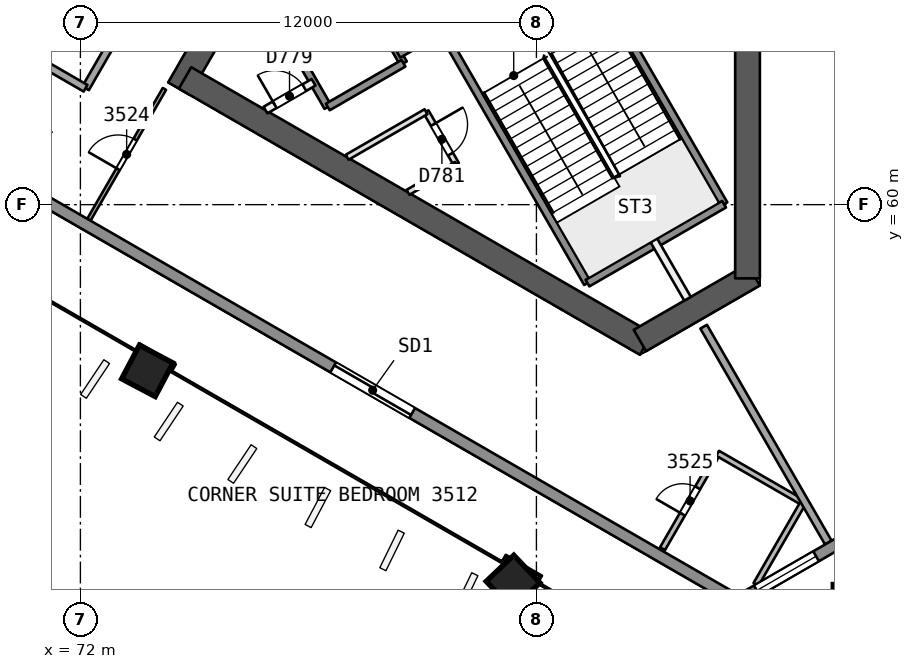
"""IFC4 building model, lengths in metres.
Left out: names, types, materials, properties, quantities, classifications, styles, units other than length and angle.
Written with IfcOpenShell. Run it as: python <this file> out.ifc"""

import sys

from ifc_helpers import new_model, si_unit, direction, frame, frame_2d, origin, origin_2d, place, context, subcontext, project, spatial, rectangle, extrude, element, fill, save


model = new_model("IFC4")
c1 = context("Model", 3, precision=1e-05, world=origin(), true_north=direction((0.0, 1.0)))
c2 = subcontext(c1, "Body", "Model", "MODEL_VIEW")
j1 = project(units=[si_unit("LENGTHUNIT", "METRE"), si_unit("PLANEANGLEUNIT", "RADIAN")], contexts=[c1])
p1 = place(None, origin())
s1 = spatial("IfcSite", under=j1, at=p1, CompositionType="ELEMENT")
p2 = place(p1, origin())
s2 = spatial("IfcBuilding", under=s1, at=p2, CompositionType="ELEMENT")
p3 = place(p2, frame((0.0, 0.0, 143.8)))
s3 = spatial("IfcBuildingStorey", under=s2, at=p3, CompositionType="ELEMENT", Elevation=143.8)
p4 = place(p3, frame((79.688, 71.881, 0.0), z_axis=(0.0, 0.0, 1.0), x_axis=(-0.49999822179, -0.866026430432, 0.0)))
e1 = element("IfcWall", 1, at=p4, inside=s3, PredefinedType="SHEAR", context=c2, shape_type="SweptSolid", body=[
    extrude(rectangle(XDim=10.192, YDim=0.65, at=frame_2d((5.096, 0.0))), origin(), (0.0, 0.0, 1.0), 3.7),
])
p5 = place(p4, frame((0.762, 0.0, 0.0)))
e2 = element("IfcOpeningElement", 2, at=p5, cuts=e1, PredefinedType="OPENING", context=c2, shape_type="SweptSolid", body=[
    extrude(rectangle(XDim=1.2, YDim=2.1, at=frame_2d((0.6, 1.05))), frame((0.0, 0.335, 0.0), z_axis=(0.0, -1.0, 0.0), x_axis=(1.0, 0.0, 0.0)), (0.0, 0.0, 1.0), 0.671),
])
p6 = place(p3, frame((74.754, 63.335, 0.0), z_axis=(0.0, 0.0, 1.0), x_axis=(0.866026250715, -0.49999853307, 0.0)))
e3 = element("IfcWall", 3, at=p6, inside=s3, PredefinedType="SHEAR", context=c2, shape_type="SweptSolid", body=[
    extrude(rectangle(XDim=14.008, YDim=0.65, at=frame_2d((7.004, 0.0))), origin(), (0.0, 0.0, 1.0), 3.7),
])
p7 = place(p3, frame((86.723, 56.425, 0.0), z_axis=(0.0, 0.0, 1.0), x_axis=(0.866031550877, 0.499989352773, 0.0)))
e4 = element("IfcWall", 4, at=p7, inside=s3, PredefinedType="SHEAR", context=c2, shape_type="SweptSolid", body=[
    extrude(rectangle(XDim=3.458, YDim=0.65, at=frame_2d((1.729, 0.0))), origin(), (0.0, 0.0, 1.0), 3.7),
])
p8 = place(p3, frame((89.555, 58.06, 0.0), z_axis=(0.0, 0.0, 1.0), x_axis=(0.0, 1.0, 0.0)))
e5 = element("IfcWall", 5, at=p8, inside=s3, PredefinedType="SHEAR", context=c2, shape_type="SweptSolid", body=[
    extrude(rectangle(XDim=14.146, YDim=0.65, at=frame_2d((7.073, 0.0))), origin(), (0.0, 0.0, 1.0), 3.7),
])
p9 = place(p3, frame((73.76, 55.599, 0.0), z_axis=(0.000857578916, 0.022824792675, 0.999739112668), x_axis=(-0.499948827021, -0.865819429986, 0.020196163479)))
e6 = element("IfcColumn", 6, at=p9, inside=s3, PredefinedType="COLUMN", context=c2, shape_type="SweptSolid", body=[
    extrude(rectangle(XDim=1.0, YDim=1.0, at=origin_2d()), origin(), (0.0, 0.0, 1.0), 3.701),
])
p10 = place(p3, frame((83.395, 50.035, 0.0), z_axis=(-0.00837646992, 0.028097450282, 0.999570091609), x_axis=(-0.499684075079, -0.865973216997, 0.020154715467)))
e7 = element("IfcColumn", 7, at=p10, inside=s3, PredefinedType="COLUMN", context=c2, shape_type="SweptSolid", body=[
    extrude(rectangle(XDim=1.0, YDim=1.0, at=origin_2d()), origin(), (0.0, 0.0, 1.0), 3.702),
])
p11 = place(p3, frame((93.031, 48.769, 0.0), z_axis=(-0.017607001884, 0.030531992032, 0.999378702468), x_axis=(0.4992500341, -0.865740835585, 0.035244986208)))
e8 = element("IfcColumn", 8, at=p11, inside=s3, PredefinedType="COLUMN", context=c2, shape_type="SweptSolid", body=[
    extrude(rectangle(XDim=2.4, YDim=2.4, at=origin_2d()), origin(), (0.0, 0.0, 1.0), 3.702),
])
p12 = place(p3, frame((88.401, 56.789, 0.0), z_axis=(0.0, 0.0, 1.0), x_axis=(0.499993018469, -0.866029434536, 0.0)))
e9 = element("IfcWall", 9, at=p12, inside=s3, PredefinedType="PARTITIONING", context=c2, shape_type="SweptSolid", body=[
    extrude(rectangle(XDim=6.561, YDim=0.2, at=frame_2d((3.281, 0.0))), origin(), (0.0, 0.0, 1.0), 3.25),
])
p13 = place(p3, frame((67.363, 62.408, 0.0), z_axis=(0.0, 0.0, 1.0), x_axis=(0.500002969958, 0.866023689072, 0.0)))
e10 = element("IfcWall", 10, at=p13, inside=s3, PredefinedType="PARTITIONING", context=c2, shape_type="SweptSolid", body=[
    extrude(rectangle(XDim=11.954, YDim=0.2, at=frame_2d((5.977, 0.0))), origin(), (0.0, 0.0, 1.0), 3.25),
])
p14 = place(p3, frame((72.223, 59.602, 0.0), z_axis=(0.0, 0.0, 1.0), x_axis=(0.499997169302, 0.866027038082, 0.0)))
e11 = element("IfcWall", 11, at=p14, inside=s3, PredefinedType="PARTITIONING", context=c2, shape_type="SweptSolid", body=[
    extrude(rectangle(XDim=3.975, YDim=0.1, at=frame_2d((1.987, 0.0))), origin(), (0.0, 0.0, 1.0), 3.25),
])
p15 = place(p14, frame((1.537, 0.0, 0.0)))
e12 = element("IfcOpeningElement", 12, at=p15, cuts=e11, PredefinedType="OPENING", context=c2, shape_type="SweptSolid", body=[
    extrude(rectangle(XDim=0.9, YDim=2.1, at=frame_2d((0.45, 1.05))), frame((0.0, 0.061, 0.0), z_axis=(0.0, -1.0, 0.0), x_axis=(1.0, 0.0, 0.0)), (0.0, 0.0, 1.0), 0.121),
])
p16 = place(p3, frame((76.636, 70.857, 0.0), z_axis=(0.0, 0.0, 1.0), x_axis=(-0.499990139034, -0.866031096941, 0.0)))
e13 = element("IfcWall", 13, at=p16, inside=s3, PredefinedType="PARTITIONING", context=c2, shape_type="SweptSolid", body=[
    extrude(rectangle(XDim=9.0, YDim=0.2, at=frame_2d((4.5, 0.0))), origin(), (0.0, 0.0, 1.0), 3.25),
])
p17 = place(p3, frame((72.136, 63.063, 0.0), z_axis=(0.0, 0.0, 1.0), x_axis=(-0.866010750942, 0.50002537861, 0.0)))
e14 = element("IfcWall", 14, at=p17, inside=s3, PredefinedType="PARTITIONING", context=c2, shape_type="SweptSolid", body=[
    extrude(rectangle(XDim=2.0, YDim=0.2, at=frame_2d((1.0, 0.0))), origin(), (0.0, 0.0, 1.0), 3.25),
])
p18 = place(p3, frame((70.404, 64.063, 0.0), z_axis=(0.0, 0.0, 1.0), x_axis=(0.499990139034, 0.866031096941, 0.0)))
e15 = element("IfcWall", 15, at=p18, inside=s3, PredefinedType="PARTITIONING", context=c2, shape_type="SweptSolid", body=[
    extrude(rectangle(XDim=9.0, YDim=0.2, at=frame_2d((4.5, 0.0))), origin(), (0.0, 0.0, 1.0), 3.25),
])
p19 = place(p18, frame((4.05, 0.0, 0.0)))
e16 = element("IfcOpeningElement", 16, at=p19, cuts=e15, PredefinedType="OPENING", context=c2, shape_type="SweptSolid", body=[
    extrude(rectangle(XDim=0.9, YDim=2.1, at=frame_2d((0.45, 1.05))), frame((0.0, 0.11, 0.0), z_axis=(0.0, -1.0, 0.0), x_axis=(1.0, 0.0, 0.0)), (0.0, 0.0, 1.0), 0.221),
])
p20 = place(p3, frame((87.318, 50.947, 0.0), z_axis=(0.0, 0.0, 1.0), x_axis=(0.499987231761, 0.866032775405, 0.0)))
e17 = element("IfcWall", 17, at=p20, inside=s3, PredefinedType="PARTITIONING", context=c2, shape_type="SweptSolid", body=[
    extrude(rectangle(XDim=2.9, YDim=0.15, at=frame_2d((1.45, 0.0))), origin(), (0.0, 0.0, 1.0), 3.25),
])
p21 = place(p20, frame((1.05, 0.0, 0.0)))
e18 = element("IfcOpeningElement", 18, at=p21, cuts=e17, PredefinedType="OPENING", context=c2, shape_type="SweptSolid", body=[
    extrude(rectangle(XDim=0.8, YDim=2.1, at=frame_2d((0.4, 1.05))), frame((0.0, 0.085, 0.0), z_axis=(0.0, -1.0, 0.0), x_axis=(1.0, 0.0, 0.0)), (0.0, 0.0, 1.0), 0.171),
])
p22 = place(p3, frame((88.768, 53.458, 0.0), z_axis=(0.0, 0.0, 1.0), x_axis=(0.866021400173, -0.500006934395, 0.0)))
e19 = element("IfcWall", 19, at=p22, inside=s3, PredefinedType="PARTITIONING", context=c2, shape_type="SweptSolid", body=[
    extrude(rectangle(XDim=2.6, YDim=0.15, at=frame_2d((1.3, 0.0))), origin(), (0.0, 0.0, 1.0), 3.25),
])
p23 = place(p3, frame((91.02, 52.158, 0.0), z_axis=(0.0, 0.0, 1.0), x_axis=(-0.500008956979, -0.866020232408, 0.0)))
e20 = element("IfcWall", 20, at=p23, inside=s3, PredefinedType="PARTITIONING", context=c2, shape_type="SweptSolid", body=[
    extrude(rectangle(XDim=2.483, YDim=0.15, at=frame_2d((1.242, 0.0))), origin(), (0.0, 0.0, 1.0), 3.25),
])
p24 = place(p3, frame((94.202, 52.39, 0.0), z_axis=(0.0, 0.0, 1.0), x_axis=(-0.866019355129, -0.500010476433, 0.0)))
e21 = element("IfcWall", 21, at=p24, inside=s3, PredefinedType="SOLIDWALL", context=c2, shape_type="SweptSolid", body=[
    extrude(rectangle(XDim=5.65, YDim=0.3, at=frame_2d((2.825, 0.0))), origin(), (0.0, 0.0, 1.0), 3.25),
])
p25 = place(p24, frame((3.284, 0.0, 0.9)))
e22 = element("IfcOpeningElement", 22, at=p25, cuts=e21, PredefinedType="OPENING", context=c2, shape_type="SweptSolid", body=[
    extrude(rectangle(XDim=1.8, YDim=1.5, at=frame_2d((0.9, 0.75))), frame((0.0, 0.161, 0.0), z_axis=(0.0, -1.0, 0.0), x_axis=(1.0, 0.0, 0.0)), (0.0, 0.0, 1.0), 0.321),
])
p26 = place(p24, frame((0.47, 0.0, 0.9)))
e23 = element("IfcOpeningElement", 23, at=p26, cuts=e21, PredefinedType="OPENING", context=c2, shape_type="SweptSolid", body=[
    extrude(rectangle(XDim=1.8, YDim=1.5, at=frame_2d((0.9, 0.75))), frame((0.0, 0.161, 0.0), z_axis=(0.0, -1.0, 0.0), x_axis=(1.0, 0.0, 0.0)), (0.0, 0.0, 1.0), 0.321),
])
p27 = place(p3, frame((89.31, 49.565, 0.0), z_axis=(0.0, 0.0, 1.0), x_axis=(-0.866024712045, 0.500001198125, 0.0)))
e24 = element("IfcWall", 24, at=p27, inside=s3, PredefinedType="SOLIDWALL", context=c2, shape_type="SweptSolid", body=[
    extrude(rectangle(XDim=55.219, YDim=0.3, at=frame_2d((27.61, 0.0))), origin(), (0.0, 0.0, 1.0), 3.25),
])
p28 = place(p27, frame((31.086, 0.0, 0.0)))
e25 = element("IfcOpeningElement", 25, at=p28, cuts=e24, PredefinedType="OPENING", context=c2, shape_type="SweptSolid", body=[
    extrude(rectangle(XDim=2.4, YDim=2.4, at=frame_2d((1.2, 1.2))), frame((0.0, 0.161, 0.0), z_axis=(0.0, -1.0, 0.0), x_axis=(1.0, 0.0, 0.0)), (0.0, 0.0, 1.0), 0.321),
])
p29 = place(p27, frame((42.892, 0.0, 0.0)))
e26 = element("IfcOpeningElement", 26, at=p29, cuts=e24, PredefinedType="OPENING", context=c2, shape_type="SweptSolid", body=[
    extrude(rectangle(XDim=2.4, YDim=2.4, at=frame_2d((1.2, 1.2))), frame((0.0, 0.161, 0.0), z_axis=(0.0, -1.0, 0.0), x_axis=(1.0, 0.0, 0.0)), (0.0, 0.0, 1.0), 0.321),
])
p30 = place(p27, frame((21.421, 0.0, 0.0)))
e27 = element("IfcOpeningElement", 27, at=p30, cuts=e24, PredefinedType="OPENING", context=c2, shape_type="SweptSolid", body=[
    extrude(rectangle(XDim=2.4, YDim=2.4, at=frame_2d((1.2, 1.2))), frame((0.0, 0.161, 0.0), z_axis=(0.0, -1.0, 0.0), x_axis=(1.0, 0.0, 0.0)), (0.0, 0.0, 1.0), 0.321),
])
p31 = place(p27, frame((9.906, 0.0, 0.0)))
e28 = element("IfcOpeningElement", 28, at=p31, cuts=e24, PredefinedType="OPENING", context=c2, shape_type="SweptSolid", body=[
    extrude(rectangle(XDim=2.4, YDim=2.4, at=frame_2d((1.2, 1.2))), frame((0.0, 0.161, 0.0), z_axis=(0.0, -1.0, 0.0), x_axis=(1.0, 0.0, 0.0)), (0.0, 0.0, 1.0), 0.321),
])
p32 = place(p27, frame((26.098, 0.0, 0.0)))
e29 = element("IfcOpeningElement", 29, at=p32, cuts=e24, PredefinedType="OPENING", context=c2, shape_type="SweptSolid", body=[
    extrude(rectangle(XDim=2.4, YDim=2.4, at=frame_2d((1.2, 1.2))), frame((0.0, 0.161, 0.0), z_axis=(0.0, -1.0, 0.0), x_axis=(1.0, 0.0, 0.0)), (0.0, 0.0, 1.0), 0.321),
])
p33 = place(p3, frame((77.135, 64.952, 0.0), z_axis=(0.0, 0.0, 1.0), x_axis=(0.499996545922, -0.866027397988, 0.0)))
e30 = element("IfcWall", 30, at=p33, inside=s3, PredefinedType="SOLIDWALL", context=c2, shape_type="SweptSolid", body=[
    extrude(rectangle(XDim=2.75, YDim=0.2, at=frame_2d((1.375, 0.0))), origin(), (0.0, 0.0, 1.0), 3.25),
])
p34 = place(p3, frame((81.094, 62.445, 0.0), z_axis=(0.0, 0.0, 1.0), x_axis=(0.499880961361, -0.866094119867, 0.0)))
e31 = element("IfcWall", 31, at=p34, inside=s3, PredefinedType="PARTITIONING", context=c2, shape_type="SweptSolid", body=[
    extrude(rectangle(XDim=1.6, YDim=0.15, at=frame_2d((0.8, 0.0))), origin(), (0.0, 0.0, 1.0), 3.25),
])
p35 = place(p34, frame((0.387, 0.0, 0.0)))
e32 = element("IfcOpeningElement", 32, at=p35, cuts=e31, PredefinedType="OPENING", context=c2, shape_type="SweptSolid", body=[
    extrude(rectangle(XDim=0.9, YDim=2.1, at=frame_2d((0.45, 1.05))), frame((0.0, 0.085, 0.0), z_axis=(0.0, -1.0, 0.0), x_axis=(1.0, 0.0, 0.0)), (0.0, 0.0, 1.0), 0.171),
])
p36 = place(p3, frame((79.127, 66.102, 0.0), z_axis=(0.0, 0.0, 1.0), x_axis=(0.499996545922, -0.866027397988, 0.0)))
e33 = element("IfcWall", 33, at=p36, inside=s3, PredefinedType="SOLIDWALL", context=c2, shape_type="SweptSolid", body=[
    extrude(rectangle(XDim=2.75, YDim=0.2, at=frame_2d((1.375, 0.0))), origin(), (0.0, 0.0, 1.0), 3.25),
])
p37 = place(p3, frame((81.493, 64.604, 0.0), z_axis=(0.0, 0.0, 1.0), x_axis=(0.500006057782, -0.866021906294, 0.0)))
e34 = element("IfcWall", 34, at=p37, inside=s3, PredefinedType="SOLIDWALL", context=c2, shape_type="SweptSolid", body=[
    extrude(rectangle(XDim=7.7, YDim=0.2, at=frame_2d((3.85, 0.0))), origin(), (0.0, 0.0, 1.0), 3.25),
])
p38 = place(p3, frame((87.09, 59.06, 0.0), z_axis=(0.0, 0.0, 1.0), x_axis=(0.499944938281, -0.866057191349, 0.0)))
e35 = element("IfcWall", 35, at=p38, inside=s3, PredefinedType="PARTITIONING", context=c2, shape_type="SweptSolid", body=[
    extrude(rectangle(XDim=1.773, YDim=0.2, at=frame_2d((0.887, 0.0))), origin(), (0.0, 0.0, 1.0), 3.25),
])
p39 = place(p3, frame((85.087, 66.679, 0.0), z_axis=(0.0, 0.0, 1.0), x_axis=(0.500019787375, -0.866013979237, 0.0)))
e36 = element("IfcWall", 36, at=p39, inside=s3, PredefinedType="SOLIDWALL", context=c2, shape_type="SweptSolid", body=[
    extrude(rectangle(XDim=7.7, YDim=0.2, at=frame_2d((3.85, 0.0))), origin(), (0.0, 0.0, 1.0), 3.25),
])
p40 = place(p39, frame((0.55, 0.0, 0.0)))
e37 = element("IfcOpeningElement", 37, at=p40, cuts=e36, PredefinedType="OPENING", context=c2, shape_type="SweptSolid", body=[
    extrude(rectangle(XDim=1.1, YDim=2.1, at=frame_2d((0.55, 1.05))), frame((0.0, 0.11, 0.0), z_axis=(0.0, -1.0, 0.0), x_axis=(1.0, 0.0, 0.0)), (0.0, 0.0, 1.0), 0.221),
])
p41 = place(p3, frame((76.87, 62.489, 0.0), z_axis=(0.0, 0.0, 1.0), x_axis=(0.866054810376, 0.49994906283, 0.0)))
e38 = element("IfcWall", 38, at=p41, inside=s3, PredefinedType="PARTITIONING", context=c2, shape_type="SweptSolid", body=[
    extrude(rectangle(XDim=1.461, YDim=0.2, at=frame_2d((0.73, 0.0))), origin(), (0.0, 0.0, 1.0), 3.25),
])
p42 = place(p41, frame((0.281, 0.0, 0.0)))
e39 = element("IfcOpeningElement", 39, at=p42, cuts=e38, PredefinedType="OPENING", context=c2, shape_type="SweptSolid", body=[
    extrude(rectangle(XDim=0.9, YDim=2.1, at=frame_2d((0.45, 1.05))), frame((0.0, 0.11, 0.0), z_axis=(0.0, -1.0, 0.0), x_axis=(1.0, 0.0, 0.0)), (0.0, 0.0, 1.0), 0.221),
])
p43 = place(p3, frame((80.367, 63.954, 0.0), z_axis=(0.0, 0.0, 1.0), x_axis=(0.866026575979, 0.499997969693, 0.0)))
e40 = element("IfcWall", 40, at=p43, inside=s3, PredefinedType="SOLIDWALL", context=c2, shape_type="SweptSolid", body=[
    extrude(rectangle(XDim=6.75, YDim=0.2, at=frame_2d((3.375, 0.0))), origin(), (0.0, 0.0, 1.0), 3.25),
])
p44 = place(p3, frame((78.51, 62.57, 0.0), z_axis=(0.0, 0.0, 1.0), x_axis=(0.866053019151, 0.499952165731, 0.0)))
e41 = element("IfcWall", 41, at=p44, inside=s3, PredefinedType="SOLIDWALL", context=c2, shape_type="SweptSolid", body=[
    extrude(rectangle(XDim=2.3, YDim=0.2, at=frame_2d((1.15, 0.0))), origin(), (0.0, 0.0, 1.0), 3.25),
])
p45 = place(p3, frame((79.02, 61.248, 0.0), z_axis=(0.0, 0.0, 1.0), x_axis=(0.866051471819, 0.499954846121, 0.0)))
e42 = element("IfcWall", 42, at=p45, inside=s3, PredefinedType="PARTITIONING", context=c2, shape_type="SweptSolid", body=[
    extrude(rectangle(XDim=2.395, YDim=0.15, at=frame_2d((1.197, 0.0))), origin(), (0.0, 0.0, 1.0), 3.25),
])
p46 = place(p3, frame((80.62, 60.324, 0.0), z_axis=(0.0, 0.0, 1.0), x_axis=(0.866069507536, 0.49992360228, 0.0)))
e43 = element("IfcWall", 43, at=p46, inside=s3, PredefinedType="PARTITIONING", context=c2, shape_type="SweptSolid", body=[
    extrude(rectangle(XDim=1.471, YDim=0.15, at=frame_2d((0.735, 0.0))), origin(), (0.0, 0.0, 1.0), 3.25),
])
p47 = place(p3, frame((85.343, 57.935, 0.0), z_axis=(0.0, 0.0, 1.0), x_axis=(0.866004344652, 0.500036473714, 0.0)))
e44 = element("IfcWall", 44, at=p47, inside=s3, PredefinedType="SOLIDWALL", context=c2, shape_type="SweptSolid", body=[
    extrude(rectangle(XDim=4.15, YDim=0.2, at=frame_2d((2.075, 0.0))), origin(), (0.0, 0.0, 1.0), 3.25),
])
p48 = place(p15, origin())
e45 = element("IfcDoor", 45, at=p48, inside=s3, OperationType="SINGLE_SWING_LEFT", PredefinedType="NOTDEFINED", context=c2, shape_type="SweptSolid", body=[
    extrude(rectangle(XDim=0.9, YDim=2.1, at=frame_2d((0.45, 1.05))), frame((0.0, 0.025, 0.0), z_axis=(0.0, -1.0, 0.0), x_axis=(1.0, 0.0, 0.0)), (0.0, 0.0, 1.0), 0.05),
])
fill(e12, e45)
p49 = place(p21, origin())
e46 = element("IfcDoor", 46, at=p49, inside=s3, OperationType="SINGLE_SWING_LEFT", PredefinedType="NOTDEFINED", context=c2, shape_type="SweptSolid", body=[
    extrude(rectangle(XDim=0.8, YDim=2.1, at=frame_2d((0.4, 1.05))), frame((0.0, 0.025, 0.0), z_axis=(0.0, -1.0, 0.0), x_axis=(1.0, 0.0, 0.0)), (0.0, 0.0, 1.0), 0.05),
])
fill(e18, e46)
p50 = place(p25, origin())
e47 = element("IfcWindow", 47, at=p50, inside=s3, PartitioningType="SINGLE_PANEL", PredefinedType="WINDOW", context=c2, shape_type="SweptSolid", body=[
    extrude(rectangle(XDim=1.8, YDim=1.5, at=frame_2d((0.9, 0.75))), frame((0.0, 0.03, 0.0), z_axis=(0.0, -1.0, 0.0), x_axis=(1.0, 0.0, 0.0)), (0.0, 0.0, 1.0), 0.06),
])
fill(e22, e47)
p51 = place(p31, origin())
e48 = element("IfcDoor", 48, at=p51, inside=s3, OperationType="SLIDING_TO_RIGHT", PredefinedType="NOTDEFINED", context=c2, shape_type="SweptSolid", body=[
    extrude(rectangle(XDim=2.4, YDim=2.4, at=frame_2d((1.2, 1.2))), frame((0.0, 0.025, 0.0), z_axis=(0.0, -1.0, 0.0), x_axis=(1.0, 0.0, 0.0)), (0.0, 0.0, 1.0), 0.05),
])
fill(e28, e48)
p52 = place(p42, origin())
e49 = element("IfcDoor", 49, at=p52, inside=s3, OperationType="SINGLE_SWING_LEFT", PredefinedType="NOTDEFINED", context=c2, shape_type="SweptSolid", body=[
    extrude(rectangle(XDim=0.9, YDim=2.1, at=frame_2d((0.45, 1.05))), frame((0.0, 0.025, 0.0), z_axis=(0.0, -1.0, 0.0), x_axis=(1.0, 0.0, 0.0)), (0.0, 0.0, 1.0), 0.05),
])
fill(e39, e49)
p53 = place(p35, origin())
e50 = element("IfcDoor", 50, at=p53, inside=s3, OperationType="SINGLE_SWING_LEFT", PredefinedType="NOTDEFINED", context=c2, shape_type="SweptSolid", body=[
    extrude(rectangle(XDim=0.9, YDim=2.1, at=frame_2d((0.45, 1.05))), frame((0.0, 0.025, 0.0), z_axis=(0.0, -1.0, 0.0), x_axis=(1.0, 0.0, 0.0)), (0.0, 0.0, 1.0), 0.05),
])
fill(e32, e50)
save(model, sys.argv[1])
